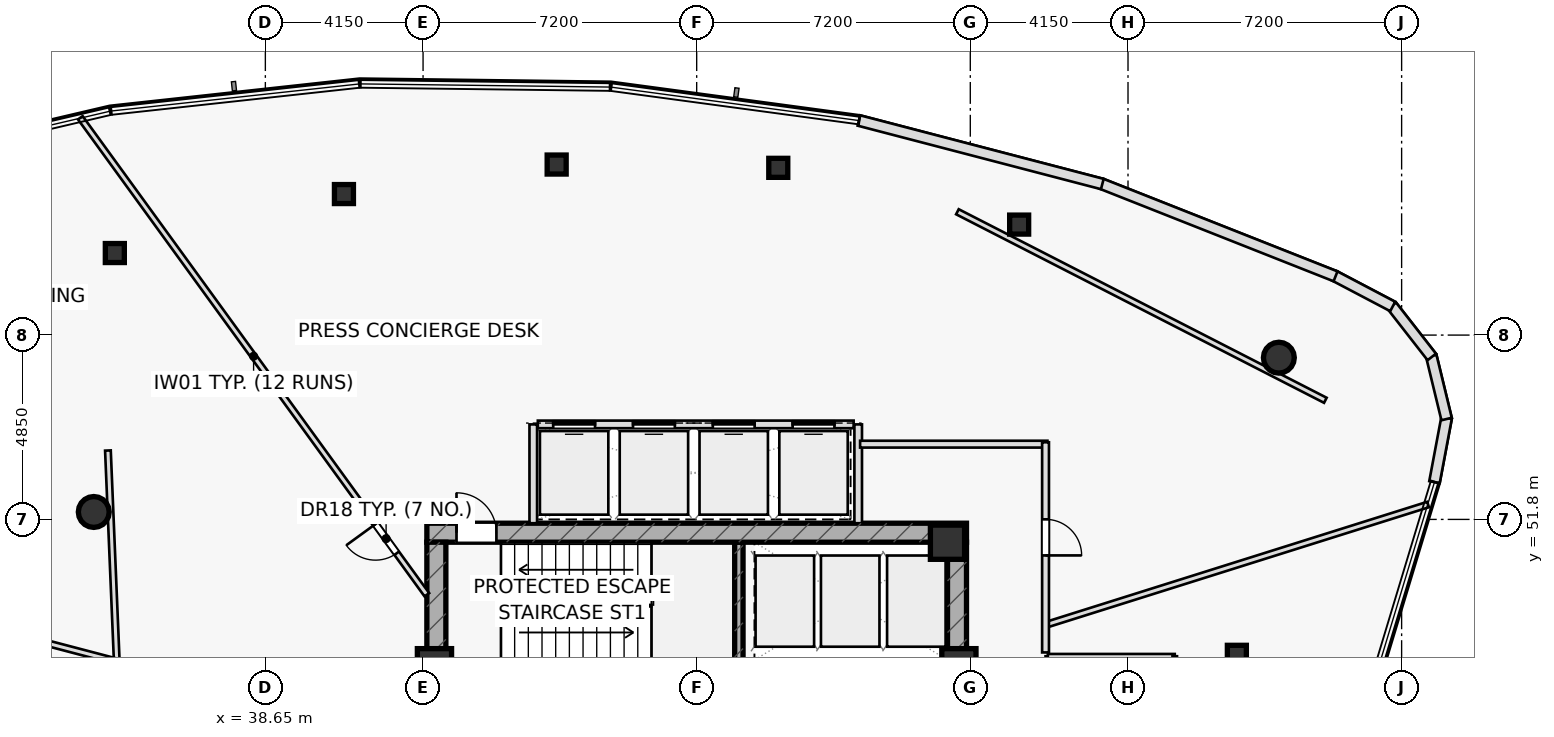
"""IFC4 building model, lengths in metres.
Left out: names, types, materials, properties, quantities, classifications, styles, units other than length and angle.
Written with IfcOpenShell. Run it as: python <this file> out.ifc"""

import sys

from ifc_helpers import new_model, si_unit, direction, frame, frame_2d, origin, origin_2d, place, context, subcontext, project, spatial, rectangle, hollow_rectangle, hollow_circle, extrude, element, fill, save


model = new_model("IFC4")
c1 = context("Model", 3, precision=1e-05, world=origin(), true_north=direction((0.0, 1.0)))
c2 = subcontext(c1, "Body", "Model", "MODEL_VIEW")
j1 = project(units=[si_unit("LENGTHUNIT", "METRE"), si_unit("PLANEANGLEUNIT", "RADIAN")], contexts=[c1])
p1 = place(None, origin())
s1 = spatial("IfcSite", under=j1, at=p1, CompositionType="ELEMENT")
p2 = place(p1, origin())
s2 = spatial("IfcBuilding", under=s1, at=p2, CompositionType="ELEMENT")
p3 = place(p2, frame((0.0, 0.0, 277.5)))
s3 = spatial("IfcBuildingStorey", under=s2, at=p3, CompositionType="ELEMENT", Elevation=277.5)
p4 = place(p3, frame((51.11, 48.1, 0.0), z_axis=(0.0, 0.0, 1.0), x_axis=(0.0, 1.0, 0.0)))
e1 = element("IfcWall", 1, at=p4, inside=s3, PredefinedType="SHEAR", context=c2, shape_type="SweptSolid", body=[
    extrude(rectangle(XDim=3.1, YDim=0.22, at=frame_2d((1.55, 0.0))), origin(), (0.0, 0.0, 1.0), 3.7),
])
p5 = place(p3, frame((42.9, 51.45, 0.0), z_axis=(0.0, 0.0, 1.0), x_axis=(1.0, 0.0, 0.0)))
e2 = element("IfcWall", 2, at=p5, inside=s3, PredefinedType="SHEAR", context=c2, shape_type="SweptSolid", body=[
    extrude(rectangle(XDim=14.2, YDim=0.5, at=frame_2d((7.1, 0.0))), origin(), (0.0, 0.0, 1.0), 3.7),
])
p6 = place(p5, frame((0.78, 0.0, 0.0)))
e3 = element("IfcOpeningElement", 3, at=p6, cuts=e2, PredefinedType="OPENING", context=c2, shape_type="SweptSolid", body=[
    extrude(rectangle(XDim=1.05, YDim=2.2, at=frame_2d((0.525, 1.1))), frame((0.0, 0.26, 0.0), z_axis=(0.0, -1.0, 0.0), x_axis=(1.0, 0.0, 0.0)), (0.0, 0.0, 1.0), 0.52),
])
p7 = place(p3, frame((43.15, 38.8, 0.0), z_axis=(0.0, 0.0, 1.0), x_axis=(0.0, 1.0, 0.0)))
e4 = element("IfcWall", 4, at=p7, inside=s3, PredefinedType="SHEAR", context=c2, shape_type="SweptSolid", body=[
    extrude(rectangle(XDim=12.4, YDim=0.5, at=frame_2d((6.2, 0.0))), origin(), (0.0, 0.0, 1.0), 3.7),
])
p8 = place(p3, frame((56.85, 38.8, 0.0), z_axis=(0.0, 0.0, 1.0), x_axis=(0.0, 1.0, 0.0)))
e5 = element("IfcWall", 5, at=p8, inside=s3, PredefinedType="SHEAR", context=c2, shape_type="SweptSolid", body=[
    extrude(rectangle(XDim=12.4, YDim=0.5, at=frame_2d((6.2, 0.0))), origin(), (0.0, 0.0, 1.0), 3.7),
])
p9 = place(p8, frame((3.85, 0.0, 0.0)))
e6 = element("IfcOpeningElement", 6, at=p9, cuts=e5, PredefinedType="OPENING", context=c2, shape_type="SweptSolid", body=[
    extrude(rectangle(XDim=1.5, YDim=2.2, at=frame_2d((0.75, 1.1))), frame((0.0, 0.26, 0.0), z_axis=(0.0, -1.0, 0.0), x_axis=(1.0, 0.0, 0.0)), (0.0, 0.0, 1.0), 0.52),
])
for number, where, z_axis, x_axis in (
    (7, (43.1, 47.95, 0.0), (0.0, 0.0, 1.0), (1.0, 0.0, 0.0)),
    (8, (56.9, 47.95, 0.0), (0.0, 0.0, 1.0), (1.0, 0.0, 0.0)),
    (9, (56.6, 51.2, 0.0), (0.0, 0.0, 1.0), (1.0, 0.0, 0.0)),
):
    element("IfcColumn", number, at=place(p3, frame(where, z_axis=z_axis, x_axis=x_axis)), inside=s3, PredefinedType="COLUMN", context=c2, shape_type="SweptSolid", body=[
        extrude(rectangle(XDim=0.9, YDim=0.9, at=origin_2d()), origin(), (0.0, 0.0, 1.0), 3.7),
    ])
p10 = place(p3, frame((34.135, 51.996, 0.0), z_axis=(0.0, 0.0, 1.0), x_axis=(1.0, 0.0, 0.0)))
e10 = element("IfcColumn", 10, at=p10, inside=s3, PredefinedType="COLUMN", context=c2, shape_type="SweptSolid", body=[
    extrude(hollow_circle(Radius=0.406, WallThickness=0.036, at=origin_2d()), origin(), (0.0, 0.0, 1.0), 3.7),
])
p11 = place(p3, frame((64.214, 48.237, 0.0), z_axis=(0.0, 0.0, 1.0), x_axis=(1.0, 0.0, 0.0)))
e11 = element("IfcColumn", 11, at=p11, inside=s3, PredefinedType="COLUMN", context=c2, shape_type="SweptSolid", body=[
    extrude(hollow_rectangle(XDim=0.5, YDim=0.5, WallThickness=0.03, at=origin_2d()), origin(), (0.0, 0.0, 1.0), 3.7),
])
p12 = place(p3, frame((65.32, 56.056, 0.0), z_axis=(0.0, 0.0, 1.0), x_axis=(1.0, 0.0, 0.0)))
e12 = element("IfcColumn", 12, at=p12, inside=s3, PredefinedType="COLUMN", context=c2, shape_type="SweptSolid", body=[
    extrude(hollow_circle(Radius=0.406, WallThickness=0.036, at=origin_2d()), origin(), (0.0, 0.0, 1.0), 3.7),
])
for number, where, z_axis, x_axis in (
    (13, (58.486, 59.557, 0.0), (0.0, 0.0, 1.0), (1.0, 0.0, 0.0)),
    (14, (52.147, 61.051, 0.0), (0.0, 0.0, 1.0), (1.0, 0.0, 0.0)),
    (15, (46.315, 61.137, 0.0), (0.0, 0.0, 1.0), (1.0, 0.0, 0.0)),
    (16, (40.718, 60.361, 0.0), (0.0, 0.0, 1.0), (1.0, 0.0, 0.0)),
    (17, (34.689, 58.809, 0.0), (0.0, 0.0, 1.0), (1.0, 0.0, 0.0)),
):
    element("IfcColumn", number, at=place(p3, frame(where, z_axis=z_axis, x_axis=x_axis)), inside=s3, PredefinedType="COLUMN", context=c2, shape_type="SweptSolid", body=[
        extrude(hollow_rectangle(XDim=0.5, YDim=0.5, WallThickness=0.03, at=origin_2d()), origin(), (0.0, 0.0, 1.0), 3.7),
    ])
for number, where, z_axis, x_axis in (
    (18, (45.7, 51.7, 0.0), (0.0, 0.0, 1.0), (0.0, 1.0, 0.0)),
    (19, (54.25, 51.7, 0.0), (0.0, 0.0, 1.0), (0.0, 1.0, 0.0)),
):
    element("IfcWall", number, at=place(p3, frame(where, z_axis=z_axis, x_axis=x_axis)), inside=s3, PredefinedType="PARTITIONING", context=c2, shape_type="SweptSolid", body=[
        extrude(rectangle(XDim=2.6, YDim=0.2, at=frame_2d((1.3, 0.0))), origin(), (0.0, 0.0, 1.0), 3.7),
    ])
p13 = place(p3, frame((34.507, 53.613, 0.0), z_axis=(0.0, 0.0, 1.0), x_axis=(0.041875090182, -0.999122853718, 0.0)))
e20 = element("IfcWall", 20, at=p13, inside=s3, PredefinedType="PARTITIONING", context=c2, shape_type="SweptSolid", body=[
    extrude(rectangle(XDim=8.139, YDim=0.15, at=frame_2d((4.069, 0.0))), origin(), (0.0, 0.0, 1.0), 3.235),
])
p14 = place(p3, frame((66.543, 54.934, 0.0), z_axis=(0.0, 0.0, 1.0), x_axis=(-0.889966951661, 0.456025026673, 0.0)))
e21 = element("IfcWall", 21, at=p14, inside=s3, PredefinedType="PARTITIONING", context=c2, shape_type="SweptSolid", body=[
    extrude(rectangle(XDim=10.879, YDim=0.15, at=frame_2d((5.439, 0.0))), origin(), (0.0, 0.0, 1.0), 3.235),
])
p15 = place(p3, frame((59.24, 41.2, 0.0), z_axis=(0.0, 0.0, 1.0), x_axis=(0.0, 1.0, 0.0)))
e22 = element("IfcWall", 22, at=p15, inside=s3, PredefinedType="PARTITIONING", context=c2, shape_type="SweptSolid", body=[
    extrude(rectangle(XDim=7.0, YDim=0.12, at=frame_2d((3.5, 0.0))), origin(), (0.0, 0.0, 1.0), 3.7),
])
p16 = place(p15, frame((1.15, 0.0, 0.0)))
e23 = element("IfcOpeningElement", 23, at=p16, cuts=e22, PredefinedType="OPENING", context=c2, shape_type="SweptSolid", body=[
    extrude(rectangle(XDim=0.9, YDim=2.05, at=frame_2d((0.45, 1.025))), frame((0.0, 0.07, 0.0), z_axis=(0.0, -1.0, 0.0), x_axis=(1.0, 0.0, 0.0)), (0.0, 0.0, 1.0), 0.14),
])
p17 = place(p15, frame((4.7, 0.0, 0.0)))
e24 = element("IfcOpeningElement", 24, at=p17, cuts=e22, PredefinedType="OPENING", context=c2, shape_type="SweptSolid", body=[
    extrude(rectangle(XDim=0.9, YDim=2.05, at=frame_2d((0.45, 1.025))), frame((0.0, 0.07, 0.0), z_axis=(0.0, -1.0, 0.0), x_axis=(1.0, 0.0, 0.0)), (0.0, 0.0, 1.0), 0.14),
])
p18 = place(p3, frame((59.24, 48.2, 0.0), z_axis=(0.0, 0.0, 1.0), x_axis=(1.0, 0.0, 0.0)))
e25 = element("IfcWall", 25, at=p18, inside=s3, PredefinedType="PARTITIONING", context=c2, shape_type="SweptSolid", body=[
    extrude(rectangle(XDim=3.34, YDim=0.12, at=frame_2d((1.67, 0.0))), origin(), (0.0, 0.0, 1.0), 3.7),
])
p19 = place(p3, frame((62.58, 41.2, 0.0), z_axis=(0.0, 0.0, 1.0), x_axis=(0.0, 1.0, 0.0)))
e26 = element("IfcWall", 26, at=p19, inside=s3, PredefinedType="PARTITIONING", context=c2, shape_type="SweptSolid", body=[
    extrude(rectangle(XDim=7.0, YDim=0.12, at=frame_2d((3.5, 0.0))), origin(), (0.0, 0.0, 1.0), 3.235),
])
p20 = place(p3, frame((42.9, 49.817, 0.0), z_axis=(0.0, 0.0, 1.0), x_axis=(-0.587773939709, 0.809025213327, 0.0)))
e27 = element("IfcWall", 27, at=p20, inside=s3, PredefinedType="PARTITIONING", context=c2, shape_type="SweptSolid", body=[
    extrude(rectangle(XDim=15.513, YDim=0.15, at=frame_2d((7.757, 0.0))), origin(), (0.0, 0.0, 1.0), 3.175),
])
p21 = place(p20, frame((1.35, 0.0, 0.0)))
e28 = element("IfcOpeningElement", 28, at=p21, cuts=e27, PredefinedType="OPENING", context=c2, shape_type="SweptSolid", body=[
    extrude(rectangle(XDim=0.95, YDim=2.05, at=frame_2d((0.475, 1.025))), frame((0.0, 0.085, 0.0), z_axis=(0.0, -1.0, 0.0), x_axis=(1.0, 0.0, 0.0)), (0.0, 0.0, 1.0), 0.17),
])
p22 = place(p3, frame((37.08, 47.448, 0.0), z_axis=(0.0, 0.0, 1.0), x_axis=(-0.967190208987, 0.254053340148, 0.0)))
e29 = element("IfcWall", 29, at=p22, inside=s3, PredefinedType="PARTITIONING", context=c2, shape_type="SweptSolid", body=[
    extrude(rectangle(XDim=11.883, YDim=0.15, at=frame_2d((5.941, 0.0))), origin(), (0.0, 0.0, 1.0), 3.175),
])
p23 = place(p3, frame((59.18, 49.023, 0.0), z_axis=(0.0, 0.0, 1.0), x_axis=(0.953860906962, 0.300248847075, 0.0)))
e30 = element("IfcWall", 30, at=p23, inside=s3, PredefinedType="PARTITIONING", context=c2, shape_type="SweptSolid", body=[
    extrude(rectangle(XDim=10.553, YDim=0.15, at=frame_2d((5.277, 0.0))), origin(), (0.0, 0.0, 1.0), 3.175),
])
p24 = place(p3, frame((54.3, 53.78, 0.0), z_axis=(0.0, 0.0, 1.0), x_axis=(1.0, 0.0, 0.0)))
e31 = element("IfcWall", 31, at=p24, inside=s3, PredefinedType="PARTITIONING", context=c2, shape_type="SweptSolid", body=[
    extrude(rectangle(XDim=4.93, YDim=0.18, at=frame_2d((2.465, 0.0))), origin(), (0.0, 0.0, 1.0), 3.7),
])
p25 = place(p3, frame((59.18, 53.83, 0.0), z_axis=(0.0, 0.0, 1.0), x_axis=(0.0, -1.0, 0.0)))
e32 = element("IfcWall", 32, at=p25, inside=s3, PredefinedType="PARTITIONING", context=c2, shape_type="SweptSolid", body=[
    extrude(rectangle(XDim=5.53, YDim=0.18, at=frame_2d((2.765, 0.0))), origin(), (0.0, 0.0, 1.0), 3.7),
])
p26 = place(p25, frame((2.028, 0.0, 0.0)))
e33 = element("IfcOpeningElement", 33, at=p26, cuts=e32, PredefinedType="OPENING", context=c2, shape_type="SweptSolid", body=[
    extrude(rectangle(XDim=0.95, YDim=2.05, at=frame_2d((0.475, 1.025))), frame((0.0, 0.1, 0.0), z_axis=(0.0, -1.0, 0.0), x_axis=(1.0, 0.0, 0.0)), (0.0, 0.0, 1.0), 0.2),
])
p27 = place(p3, frame((69.415, 52.781, 0.0), z_axis=(0.0, 0.0, 1.0), x_axis=(0.184717139084, 0.982791726933, 0.0)))
e34 = element("IfcWall", 34, at=p27, inside=s3, PredefinedType="STANDARD", context=c2, shape_type="SweptSolid", body=[
    extrude(rectangle(XDim=1.719, YDim=0.28, at=frame_2d((0.86, 0.0))), origin(), (0.0, 0.0, 1.0), 3.7),
])
p28 = place(p3, frame((69.733, 54.442, 0.0), z_axis=(0.0, 0.0, 1.0), x_axis=(-0.236037829125, 0.971743867087, 0.0)))
e35 = element("IfcWall", 35, at=p28, inside=s3, PredefinedType="STANDARD", context=c2, shape_type="SweptSolid", body=[
    extrude(rectangle(XDim=1.708, YDim=0.28, at=frame_2d((0.854, 0.0))), origin(), (0.0, 0.0, 1.0), 3.7),
])
p29 = place(p3, frame((69.343, 56.075, 0.0), z_axis=(0.0, 0.0, 1.0), x_axis=(-0.61507801106, 0.788466258194, 0.0)))
e36 = element("IfcWall", 36, at=p29, inside=s3, PredefinedType="STANDARD", context=c2, shape_type="SweptSolid", body=[
    extrude(rectangle(XDim=1.708, YDim=0.28, at=frame_2d((0.854, 0.0))), origin(), (0.0, 0.0, 1.0), 3.7),
])
p30 = place(p3, frame((68.315, 57.403, 0.0), z_axis=(0.0, 0.0, 1.0), x_axis=(-0.884951881777, 0.465682474374, 0.0)))
e37 = element("IfcWall", 37, at=p30, inside=s3, PredefinedType="STANDARD", context=c2, shape_type="SweptSolid", body=[
    extrude(rectangle(XDim=1.731, YDim=0.28, at=frame_2d((0.865, 0.0))), origin(), (0.0, 0.0, 1.0), 3.7),
])
p31 = place(p3, frame((66.811, 58.196, 0.0), z_axis=(0.0, 0.0, 1.0), x_axis=(-0.929927335344, 0.367743322143, 0.0)))
e38 = element("IfcWall", 38, at=p31, inside=s3, PredefinedType="STANDARD", context=c2, shape_type="SweptSolid", body=[
    extrude(rectangle(XDim=6.63, YDim=0.28, at=frame_2d((3.315, 0.0))), origin(), (0.0, 0.0, 1.0), 3.7),
])
p32 = place(p3, frame((60.674, 60.625, 0.0), z_axis=(0.0, 0.0, 1.0), x_axis=(-0.967600032168, 0.252487975452, 0.0)))
e39 = element("IfcWall", 39, at=p32, inside=s3, PredefinedType="STANDARD", context=c2, shape_type="SweptSolid", body=[
    extrude(rectangle(XDim=6.618, YDim=0.28, at=frame_2d((3.309, 0.0))), origin(), (0.0, 0.0, 1.0), 3.7),
])
p33 = place(p3, frame((45.82, 54.3, 0.0), z_axis=(0.0, 0.0, 1.0), x_axis=(1.0, 0.0, 0.0)))
e40 = element("IfcWall", 40, at=p33, inside=s3, PredefinedType="PARTITIONING", context=c2, shape_type="SweptSolid", body=[
    extrude(rectangle(XDim=8.31, YDim=0.2, at=frame_2d((4.155, 0.0))), origin(), (0.0, 0.0, 1.0), 3.7),
])
p34 = place(p33, frame((0.405, 0.0, 0.0)))
e41 = element("IfcOpeningElement", 41, at=p34, cuts=e40, PredefinedType="OPENING", context=c2, shape_type="SweptSolid", body=[
    extrude(rectangle(XDim=1.1, YDim=2.15, at=frame_2d((0.55, 1.075))), frame((0.0, 0.11, 0.0), z_axis=(0.0, -1.0, 0.0), x_axis=(1.0, 0.0, 0.0)), (0.0, 0.0, 1.0), 0.22),
])
p35 = place(p33, frame((2.505, 0.0, 0.0)))
e42 = element("IfcOpeningElement", 42, at=p35, cuts=e40, PredefinedType="OPENING", context=c2, shape_type="SweptSolid", body=[
    extrude(rectangle(XDim=1.1, YDim=2.15, at=frame_2d((0.55, 1.075))), frame((0.0, 0.11, 0.0), z_axis=(0.0, -1.0, 0.0), x_axis=(1.0, 0.0, 0.0)), (0.0, 0.0, 1.0), 0.22),
])
p36 = place(p33, frame((4.605, 0.0, 0.0)))
e43 = element("IfcOpeningElement", 43, at=p36, cuts=e40, PredefinedType="OPENING", context=c2, shape_type="SweptSolid", body=[
    extrude(rectangle(XDim=1.1, YDim=2.15, at=frame_2d((0.55, 1.075))), frame((0.0, 0.11, 0.0), z_axis=(0.0, -1.0, 0.0), x_axis=(1.0, 0.0, 0.0)), (0.0, 0.0, 1.0), 0.22),
])
p37 = place(p33, frame((6.705, 0.0, 0.0)))
e44 = element("IfcOpeningElement", 44, at=p37, cuts=e40, PredefinedType="OPENING", context=c2, shape_type="SweptSolid", body=[
    extrude(rectangle(XDim=1.1, YDim=2.15, at=frame_2d((0.55, 1.075))), frame((0.0, 0.11, 0.0), z_axis=(0.0, -1.0, 0.0), x_axis=(1.0, 0.0, 0.0)), (0.0, 0.0, 1.0), 0.22),
])
p38 = place(p6, origin())
e45 = element("IfcDoor", 45, at=p38, inside=s3, OperationType="SINGLE_SWING_LEFT", PredefinedType="DOOR", context=c2, shape_type="SweptSolid", body=[
    extrude(rectangle(XDim=1.05, YDim=2.2, at=frame_2d((0.525, 1.1))), frame((0.0, 0.025, 0.0), z_axis=(0.0, -1.0, 0.0), x_axis=(1.0, 0.0, 0.0)), (0.0, 0.0, 1.0), 0.05),
])
fill(e3, e45)
p39 = place(p21, origin())
e46 = element("IfcDoor", 46, at=p39, inside=s3, OperationType="SINGLE_SWING_RIGHT", PredefinedType="DOOR", context=c2, shape_type="SweptSolid", body=[
    extrude(rectangle(XDim=0.95, YDim=2.05, at=frame_2d((0.475, 1.025))), frame((0.0, 0.025, 0.0), z_axis=(0.0, -1.0, 0.0), x_axis=(1.0, 0.0, 0.0)), (0.0, 0.0, 1.0), 0.05),
])
fill(e28, e46)
p40 = place(p26, origin())
e47 = element("IfcDoor", 47, at=p40, inside=s3, OperationType="SINGLE_SWING_RIGHT", PredefinedType="DOOR", context=c2, shape_type="SweptSolid", body=[
    extrude(rectangle(XDim=0.95, YDim=2.05, at=frame_2d((0.475, 1.025))), frame((0.0, 0.025, 0.0), z_axis=(0.0, -1.0, 0.0), x_axis=(1.0, 0.0, 0.0)), (0.0, 0.0, 1.0), 0.05),
])
fill(e33, e47)
p41 = place(p34, origin())
e48 = element("IfcDoor", 48, at=p41, inside=s3, OperationType="SLIDING_TO_LEFT", PredefinedType="DOOR", context=c2, shape_type="SweptSolid", body=[
    extrude(rectangle(XDim=1.1, YDim=2.15, at=frame_2d((0.55, 1.075))), frame((0.0, 0.025, 0.0), z_axis=(0.0, -1.0, 0.0), x_axis=(1.0, 0.0, 0.0)), (0.0, 0.0, 1.0), 0.05),
])
fill(e41, e48)
p42 = place(p35, origin())
e49 = element("IfcDoor", 49, at=p42, inside=s3, OperationType="SLIDING_TO_RIGHT", PredefinedType="DOOR", context=c2, shape_type="SweptSolid", body=[
    extrude(rectangle(XDim=1.1, YDim=2.15, at=frame_2d((0.55, 1.075))), frame((0.0, 0.025, 0.0), z_axis=(0.0, -1.0, 0.0), x_axis=(1.0, 0.0, 0.0)), (0.0, 0.0, 1.0), 0.05),
])
fill(e42, e49)
p43 = place(p36, origin())
e50 = element("IfcDoor", 50, at=p43, inside=s3, OperationType="SLIDING_TO_LEFT", PredefinedType="DOOR", context=c2, shape_type="SweptSolid", body=[
    extrude(rectangle(XDim=1.1, YDim=2.15, at=frame_2d((0.55, 1.075))), frame((0.0, 0.025, 0.0), z_axis=(0.0, -1.0, 0.0), x_axis=(1.0, 0.0, 0.0)), (0.0, 0.0, 1.0), 0.05),
])
fill(e43, e50)
p44 = place(p37, origin())
e51 = element("IfcDoor", 51, at=p44, inside=s3, OperationType="SLIDING_TO_RIGHT", PredefinedType="DOOR", context=c2, shape_type="SweptSolid", body=[
    extrude(rectangle(XDim=1.1, YDim=2.15, at=frame_2d((0.55, 1.075))), frame((0.0, 0.025, 0.0), z_axis=(0.0, -1.0, 0.0), x_axis=(1.0, 0.0, 0.0)), (0.0, 0.0, 1.0), 0.05),
])
fill(e44, e51)
save(model, sys.argv[1])
